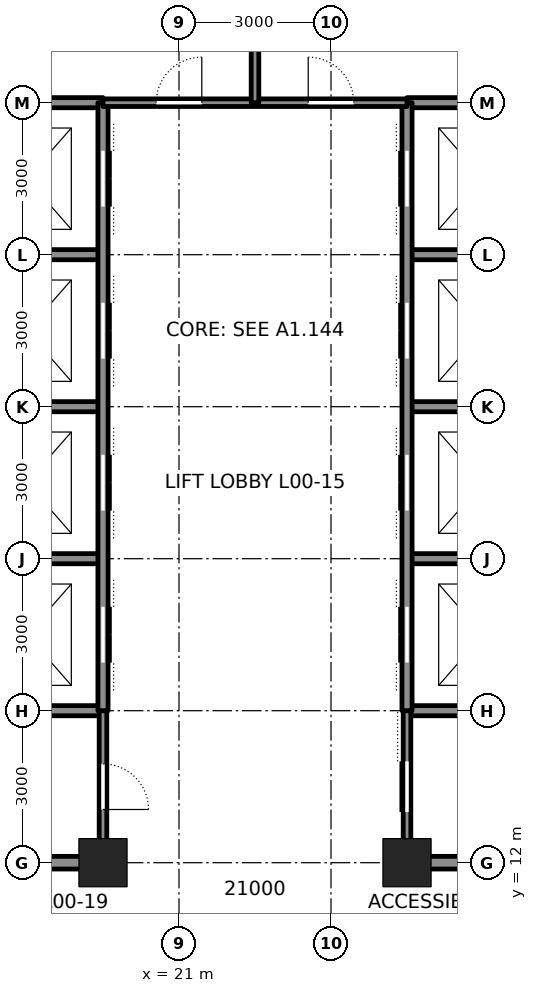
"""IFC4 building model, lengths in metres.
Left out: names, types, materials, properties, quantities, classifications, styles, units other than length and angle.
Written with IfcOpenShell. Run it as: python <this file> out.ifc"""

import sys

from ifc_helpers import new_model, si_unit, direction, frame, frame_2d, origin, origin_2d, place, context, subcontext, project, spatial, rectangle, hollow_rectangle, extrude, element, fill, save


model = new_model("IFC4")
c1 = context("Model", 3, precision=1e-05, world=origin(), true_north=direction((0.0, 1.0)))
c2 = subcontext(c1, "Body", "Model", "MODEL_VIEW")
j1 = project(units=[si_unit("LENGTHUNIT", "METRE"), si_unit("PLANEANGLEUNIT", "RADIAN")], contexts=[c1])
p1 = place(None, origin())
s1 = spatial("IfcSite", under=j1, at=p1, CompositionType="ELEMENT")
p2 = place(p1, origin())
s2 = spatial("IfcBuilding", under=s1, at=p2, CompositionType="ELEMENT")
p3 = place(p2, origin())
s3 = spatial("IfcBuildingStorey", under=s2, at=p3, CompositionType="ELEMENT", Elevation=0.0)
for number, where, z_axis, x_axis in (
    (1, (19.5, 12.0, 0.0), (0.0, 0.0, 1.0), (1.0, 0.0, 0.0)),
    (2, (25.5, 12.0, 0.0), (0.0, 0.0, 1.0), (1.0, 0.0, 0.0)),
):
    element("IfcColumn", number, at=place(p3, frame(where, z_axis=z_axis, x_axis=x_axis)), inside=s3, PredefinedType="COLUMN", context=c2, shape_type="SweptSolid", body=[
        extrude(hollow_rectangle(XDim=0.95, YDim=0.95, WallThickness=0.095, at=origin_2d()), origin(), (0.0, 0.0, 1.0), 6.0),
    ])
for number, where, z_axis, x_axis in (
    (3, (16.75, 12.0, 0.0), (0.0, 0.0, 1.0), (1.0, 0.0, 0.0)),
    (4, (25.75, 12.0, 0.0), (0.0, 0.0, 1.0), (1.0, 0.0, 0.0)),
):
    element("IfcWall", number, at=place(p3, frame(where, z_axis=z_axis, x_axis=x_axis)), inside=s3, PredefinedType="SOLIDWALL", context=c2, shape_type="SweptSolid", body=[
        extrude(rectangle(XDim=2.5, YDim=0.25, at=frame_2d((1.25, 0.0))), origin(), (0.0, 0.0, 1.0), 4.941),
    ])
for number, where, z_axis, x_axis in (
    (5, (12.0, 15.0, 0.0), (0.0, 0.0, 1.0), (1.0, 0.0, 0.0)),
    (6, (25.5, 15.0, 0.0), (0.0, 0.0, 1.0), (1.0, 0.0, 0.0)),
):
    element("IfcWall", number, at=place(p3, frame(where, z_axis=z_axis, x_axis=x_axis)), inside=s3, PredefinedType="SOLIDWALL", context=c2, shape_type="SweptSolid", body=[
        extrude(rectangle(XDim=7.5, YDim=0.2, at=frame_2d((3.75, 0.0))), origin(), (0.0, 0.0, 1.0), 5.8),
    ])
for number, where, z_axis, x_axis in (
    (7, (16.75, 24.0, 0.0), (0.0, 0.0, 1.0), (1.0, 0.0, 0.0)),
    (8, (25.5, 24.0, 0.0), (0.0, 0.0, 1.0), (1.0, 0.0, 0.0)),
):
    element("IfcWall", number, at=place(p3, frame(where, z_axis=z_axis, x_axis=x_axis)), inside=s3, PredefinedType="SOLIDWALL", context=c2, shape_type="SweptSolid", body=[
        extrude(rectangle(XDim=2.75, YDim=0.2, at=frame_2d((1.375, 0.0))), origin(), (0.0, 0.0, 1.0), 4.85),
    ])
p4 = place(p3, frame((12.0, 27.0, 0.0), z_axis=(0.0, 0.0, 1.0), x_axis=(1.0, 0.0, 0.0)))
e9 = element("IfcWall", 9, at=p4, inside=s3, PredefinedType="SOLIDWALL", context=c2, shape_type="SweptSolid", body=[
    extrude(rectangle(XDim=7.5, YDim=0.2, at=frame_2d((3.75, 0.0))), origin(), (0.0, 0.0, 1.0), 5.8),
])
p5 = place(p4, frame((1.65, 0.0, 0.0)))
e10 = element("IfcOpeningElement", 10, at=p5, cuts=e9, PredefinedType="OPENING", context=c2, shape_type="SweptSolid", body=[
    extrude(rectangle(XDim=1.2, YDim=2.1, at=frame_2d((0.6, 1.05))), frame((0.0, 0.11, 0.0), z_axis=(0.0, -1.0, 0.0), x_axis=(1.0, 0.0, 0.0)), (0.0, 0.0, 1.0), 0.22),
])
for number, where, z_axis, x_axis in (
    (11, (25.5, 27.0, 0.0), (0.0, 0.0, 1.0), (1.0, 0.0, 0.0)),
    (12, (16.5, 18.0, 0.0), (0.0, 0.0, 1.0), (1.0, 0.0, 0.0)),
):
    element("IfcWall", number, at=place(p3, frame(where, z_axis=z_axis, x_axis=x_axis)), inside=s3, PredefinedType="SOLIDWALL", context=c2, shape_type="SweptSolid", body=[
        extrude(rectangle(XDim=3.0, YDim=0.2, at=frame_2d((1.5, 0.0))), origin(), (0.0, 0.0, 1.0), 5.8),
    ])
p6 = place(p3, frame((25.5, 18.0, 0.0), z_axis=(0.0, 0.0, 1.0), x_axis=(1.0, 0.0, 0.0)))
e13 = element("IfcWall", 13, at=p6, inside=s3, PredefinedType="SOLIDWALL", context=c2, shape_type="SweptSolid", body=[
    extrude(rectangle(XDim=7.5, YDim=0.2, at=frame_2d((3.75, 0.0))), origin(), (0.0, 0.0, 1.0), 5.8),
])
p7 = place(p6, frame((4.65, 0.0, 0.0)))
e14 = element("IfcOpeningElement", 14, at=p7, cuts=e13, PredefinedType="OPENING", context=c2, shape_type="SweptSolid", body=[
    extrude(rectangle(XDim=1.2, YDim=2.1, at=frame_2d((0.6, 1.05))), frame((0.0, 0.11, 0.0), z_axis=(0.0, -1.0, 0.0), x_axis=(1.0, 0.0, 0.0)), (0.0, 0.0, 1.0), 0.22),
])
for number, where, z_axis, x_axis in (
    (15, (16.75, 21.0, 0.0), (0.0, 0.0, 1.0), (1.0, 0.0, 0.0)),
    (16, (25.5, 21.0, 0.0), (0.0, 0.0, 1.0), (1.0, 0.0, 0.0)),
):
    element("IfcWall", number, at=place(p3, frame(where, z_axis=z_axis, x_axis=x_axis)), inside=s3, PredefinedType="SOLIDWALL", context=c2, shape_type="SweptSolid", body=[
        extrude(rectangle(XDim=2.75, YDim=0.2, at=frame_2d((1.375, 0.0))), origin(), (0.0, 0.0, 1.0), 4.85),
    ])
p8 = place(p3, frame((19.5, 12.25, 0.0), z_axis=(0.0, 0.0, 1.0), x_axis=(0.0, 1.0, 0.0)))
e17 = element("IfcWall", 17, at=p8, inside=s3, PredefinedType="PARTITIONING", context=c2, shape_type="SweptSolid", body=[
    extrude(rectangle(XDim=2.75, YDim=0.15, at=frame_2d((1.375, 0.0))), origin(), (0.0, 0.0, 1.0), 4.825),
])
p9 = place(p8, frame((0.8, 0.0, 0.0)))
e18 = element("IfcOpeningElement", 18, at=p9, cuts=e17, PredefinedType="OPENING", context=c2, shape_type="SweptSolid", body=[
    extrude(rectangle(XDim=0.9, YDim=2.1, at=frame_2d((0.45, 1.05))), frame((0.0, 0.085, 0.0), z_axis=(0.0, -1.0, 0.0), x_axis=(1.0, 0.0, 0.0)), (0.0, 0.0, 1.0), 0.17),
])
p10 = place(p3, frame((19.5, 15.0, 0.0), z_axis=(0.0, 0.0, 1.0), x_axis=(0.0, 1.0, 0.0)))
e19 = element("IfcWall", 19, at=p10, inside=s3, PredefinedType="SOLIDWALL", context=c2, shape_type="SweptSolid", body=[
    extrude(rectangle(XDim=12.0, YDim=0.2, at=frame_2d((6.0, 0.0))), origin(), (0.0, 0.0, 1.0), 4.825),
])
p11 = place(p10, frame((0.95, 0.0, 0.0)))
e20 = element("IfcOpeningElement", 20, at=p11, cuts=e19, PredefinedType="OPENING", context=c2, shape_type="SweptSolid", body=[
    extrude(rectangle(XDim=1.1, YDim=2.1, at=frame_2d((0.55, 1.05))), frame((0.0, 0.11, 0.0), z_axis=(0.0, -1.0, 0.0), x_axis=(1.0, 0.0, 0.0)), (0.0, 0.0, 1.0), 0.22),
])
p12 = place(p10, frame((3.95, 0.0, 0.0)))
e21 = element("IfcOpeningElement", 21, at=p12, cuts=e19, PredefinedType="OPENING", context=c2, shape_type="SweptSolid", body=[
    extrude(rectangle(XDim=1.1, YDim=2.1, at=frame_2d((0.55, 1.05))), frame((0.0, 0.11, 0.0), z_axis=(0.0, -1.0, 0.0), x_axis=(1.0, 0.0, 0.0)), (0.0, 0.0, 1.0), 0.22),
])
p13 = place(p10, frame((6.95, 0.0, 0.0)))
e22 = element("IfcOpeningElement", 22, at=p13, cuts=e19, PredefinedType="OPENING", context=c2, shape_type="SweptSolid", body=[
    extrude(rectangle(XDim=1.1, YDim=2.1, at=frame_2d((0.55, 1.05))), frame((0.0, 0.11, 0.0), z_axis=(0.0, -1.0, 0.0), x_axis=(1.0, 0.0, 0.0)), (0.0, 0.0, 1.0), 0.22),
])
p14 = place(p10, frame((9.95, 0.0, 0.0)))
e23 = element("IfcOpeningElement", 23, at=p14, cuts=e19, PredefinedType="OPENING", context=c2, shape_type="SweptSolid", body=[
    extrude(rectangle(XDim=1.1, YDim=2.1, at=frame_2d((0.55, 1.05))), frame((0.0, 0.11, 0.0), z_axis=(0.0, -1.0, 0.0), x_axis=(1.0, 0.0, 0.0)), (0.0, 0.0, 1.0), 0.22),
])
p15 = place(p3, frame((25.5, 12.25, 0.0), z_axis=(0.0, 0.0, 1.0), x_axis=(0.0, 1.0, 0.0)))
e24 = element("IfcWall", 24, at=p15, inside=s3, PredefinedType="PARTITIONING", context=c2, shape_type="SweptSolid", body=[
    extrude(rectangle(XDim=2.75, YDim=0.15, at=frame_2d((1.375, 0.0))), origin(), (0.0, 0.0, 1.0), 4.825),
])
p16 = place(p15, frame((0.75, 0.0, 0.0)))
e25 = element("IfcOpeningElement", 25, at=p16, cuts=e24, PredefinedType="OPENING", context=c2, shape_type="SweptSolid", body=[
    extrude(rectangle(XDim=1.0, YDim=2.1, at=frame_2d((0.5, 1.05))), frame((0.0, 0.085, 0.0), z_axis=(0.0, -1.0, 0.0), x_axis=(1.0, 0.0, 0.0)), (0.0, 0.0, 1.0), 0.17),
])
p17 = place(p3, frame((25.5, 15.0, 0.0), z_axis=(0.0, 0.0, 1.0), x_axis=(0.0, 1.0, 0.0)))
e26 = element("IfcWall", 26, at=p17, inside=s3, PredefinedType="SOLIDWALL", context=c2, shape_type="SweptSolid", body=[
    extrude(rectangle(XDim=12.0, YDim=0.2, at=frame_2d((6.0, 0.0))), origin(), (0.0, 0.0, 1.0), 4.825),
])
p18 = place(p17, frame((0.95, 0.0, 0.0)))
e27 = element("IfcOpeningElement", 27, at=p18, cuts=e26, PredefinedType="OPENING", context=c2, shape_type="SweptSolid", body=[
    extrude(rectangle(XDim=1.1, YDim=2.1, at=frame_2d((0.55, 1.05))), frame((0.0, 0.11, 0.0), z_axis=(0.0, -1.0, 0.0), x_axis=(1.0, 0.0, 0.0)), (0.0, 0.0, 1.0), 0.22),
])
p19 = place(p17, frame((3.95, 0.0, 0.0)))
e28 = element("IfcOpeningElement", 28, at=p19, cuts=e26, PredefinedType="OPENING", context=c2, shape_type="SweptSolid", body=[
    extrude(rectangle(XDim=1.1, YDim=2.1, at=frame_2d((0.55, 1.05))), frame((0.0, 0.11, 0.0), z_axis=(0.0, -1.0, 0.0), x_axis=(1.0, 0.0, 0.0)), (0.0, 0.0, 1.0), 0.22),
])
p20 = place(p17, frame((6.95, 0.0, 0.0)))
e29 = element("IfcOpeningElement", 29, at=p20, cuts=e26, PredefinedType="OPENING", context=c2, shape_type="SweptSolid", body=[
    extrude(rectangle(XDim=1.1, YDim=2.1, at=frame_2d((0.55, 1.05))), frame((0.0, 0.11, 0.0), z_axis=(0.0, -1.0, 0.0), x_axis=(1.0, 0.0, 0.0)), (0.0, 0.0, 1.0), 0.22),
])
p21 = place(p17, frame((9.95, 0.0, 0.0)))
e30 = element("IfcOpeningElement", 30, at=p21, cuts=e26, PredefinedType="OPENING", context=c2, shape_type="SweptSolid", body=[
    extrude(rectangle(XDim=1.1, YDim=2.1, at=frame_2d((0.55, 1.05))), frame((0.0, 0.11, 0.0), z_axis=(0.0, -1.0, 0.0), x_axis=(1.0, 0.0, 0.0)), (0.0, 0.0, 1.0), 0.22),
])
p22 = place(p3, frame((19.5, 27.0, 0.0), z_axis=(0.0, 0.0, 1.0), x_axis=(1.0, 0.0, 0.0)))
e31 = element("IfcWall", 31, at=p22, inside=s3, PredefinedType="PARTITIONING", context=c2, shape_type="SweptSolid", body=[
    extrude(rectangle(XDim=6.0, YDim=0.15, at=frame_2d((3.0, 0.0))), origin(), (0.0, 0.0, 1.0), 5.8),
])
p23 = place(p22, frame((1.05, 0.0, 0.0)))
e32 = element("IfcOpeningElement", 32, at=p23, cuts=e31, PredefinedType="OPENING", context=c2, shape_type="SweptSolid", body=[
    extrude(rectangle(XDim=0.9, YDim=2.1, at=frame_2d((0.45, 1.05))), frame((0.0, 0.085, 0.0), z_axis=(0.0, -1.0, 0.0), x_axis=(1.0, 0.0, 0.0)), (0.0, 0.0, 1.0), 0.17),
])
p24 = place(p22, frame((4.05, 0.0, 0.0)))
e33 = element("IfcOpeningElement", 33, at=p24, cuts=e31, PredefinedType="OPENING", context=c2, shape_type="SweptSolid", body=[
    extrude(rectangle(XDim=0.9, YDim=2.1, at=frame_2d((0.45, 1.05))), frame((0.0, 0.085, 0.0), z_axis=(0.0, -1.0, 0.0), x_axis=(1.0, 0.0, 0.0)), (0.0, 0.0, 1.0), 0.17),
])
p25 = place(p3, frame((22.5, 27.0, 0.0), z_axis=(0.0, 0.0, 1.0), x_axis=(0.0, 1.0, 0.0)))
e34 = element("IfcWall", 34, at=p25, inside=s3, PredefinedType="PARTITIONING", context=c2, shape_type="SweptSolid", body=[
    extrude(rectangle(XDim=6.0, YDim=0.15, at=frame_2d((3.0, 0.0))), origin(), (0.0, 0.0, 1.0), 5.8),
])
p26 = place(p23, origin())
e35 = element("IfcDoor", 35, at=p26, inside=s3, OperationType="SINGLE_SWING_RIGHT", PredefinedType="DOOR", context=c2, shape_type="SweptSolid", body=[
    extrude(rectangle(XDim=0.9, YDim=2.1, at=frame_2d((0.45, 1.05))), frame((0.0, 0.025, 0.0), z_axis=(0.0, -1.0, 0.0), x_axis=(1.0, 0.0, 0.0)), (0.0, 0.0, 1.0), 0.05),
])
fill(e32, e35)
p27 = place(p24, origin())
e36 = element("IfcDoor", 36, at=p27, inside=s3, OperationType="SINGLE_SWING_LEFT", PredefinedType="DOOR", context=c2, shape_type="SweptSolid", body=[
    extrude(rectangle(XDim=0.9, YDim=2.1, at=frame_2d((0.45, 1.05))), frame((0.0, 0.025, 0.0), z_axis=(0.0, -1.0, 0.0), x_axis=(1.0, 0.0, 0.0)), (0.0, 0.0, 1.0), 0.05),
])
fill(e33, e36)
p28 = place(p16, origin())
e37 = element("IfcDoor", 37, at=p28, inside=s3, OperationType="SLIDING_TO_LEFT", PredefinedType="DOOR", context=c2, shape_type="SweptSolid", body=[
    extrude(rectangle(XDim=1.0, YDim=2.1, at=frame_2d((0.5, 1.05))), frame((0.0, 0.025, 0.0), z_axis=(0.0, -1.0, 0.0), x_axis=(1.0, 0.0, 0.0)), (0.0, 0.0, 1.0), 0.05),
])
fill(e25, e37)
p29 = place(p9, frame((0.9, 0.0, 0.0), z_axis=(0.0, 0.0, 1.0), x_axis=(-1.0, 0.0, 0.0)))
e38 = element("IfcDoor", 38, at=p29, inside=s3, OperationType="SINGLE_SWING_RIGHT", PredefinedType="DOOR", context=c2, shape_type="SweptSolid", body=[
    extrude(rectangle(XDim=0.9, YDim=2.1, at=frame_2d((0.45, 1.05))), frame((0.0, 0.025, 0.0), z_axis=(0.0, -1.0, 0.0), x_axis=(1.0, 0.0, 0.0)), (0.0, 0.0, 1.0), 0.05),
])
fill(e18, e38)
p30 = place(p11, origin())
e39 = element("IfcDoor", 39, at=p30, inside=s3, OperationType="DOUBLE_DOOR_SLIDING", PredefinedType="DOOR", context=c2, shape_type="SweptSolid", body=[
    extrude(rectangle(XDim=1.1, YDim=2.1, at=frame_2d((0.55, 1.05))), frame((0.0, 0.025, 0.0), z_axis=(0.0, -1.0, 0.0), x_axis=(1.0, 0.0, 0.0)), (0.0, 0.0, 1.0), 0.05),
])
fill(e20, e39)
p31 = place(p18, origin())
e40 = element("IfcDoor", 40, at=p31, inside=s3, OperationType="DOUBLE_DOOR_SLIDING", PredefinedType="DOOR", context=c2, shape_type="SweptSolid", body=[
    extrude(rectangle(XDim=1.1, YDim=2.1, at=frame_2d((0.55, 1.05))), frame((0.0, 0.025, 0.0), z_axis=(0.0, -1.0, 0.0), x_axis=(1.0, 0.0, 0.0)), (0.0, 0.0, 1.0), 0.05),
])
fill(e27, e40)
p32 = place(p12, origin())
e41 = element("IfcDoor", 41, at=p32, inside=s3, OperationType="DOUBLE_DOOR_SLIDING", PredefinedType="DOOR", context=c2, shape_type="SweptSolid", body=[
    extrude(rectangle(XDim=1.1, YDim=2.1, at=frame_2d((0.55, 1.05))), frame((0.0, 0.025, 0.0), z_axis=(0.0, -1.0, 0.0), x_axis=(1.0, 0.0, 0.0)), (0.0, 0.0, 1.0), 0.05),
])
fill(e21, e41)
p33 = place(p19, origin())
e42 = element("IfcDoor", 42, at=p33, inside=s3, OperationType="DOUBLE_DOOR_SLIDING", PredefinedType="DOOR", context=c2, shape_type="SweptSolid", body=[
    extrude(rectangle(XDim=1.1, YDim=2.1, at=frame_2d((0.55, 1.05))), frame((0.0, 0.025, 0.0), z_axis=(0.0, -1.0, 0.0), x_axis=(1.0, 0.0, 0.0)), (0.0, 0.0, 1.0), 0.05),
])
fill(e28, e42)
p34 = place(p13, origin())
e43 = element("IfcDoor", 43, at=p34, inside=s3, OperationType="DOUBLE_DOOR_SLIDING", PredefinedType="DOOR", context=c2, shape_type="SweptSolid", body=[
    extrude(rectangle(XDim=1.1, YDim=2.1, at=frame_2d((0.55, 1.05))), frame((0.0, 0.025, 0.0), z_axis=(0.0, -1.0, 0.0), x_axis=(1.0, 0.0, 0.0)), (0.0, 0.0, 1.0), 0.05),
])
fill(e22, e43)
p35 = place(p20, origin())
e44 = element("IfcDoor", 44, at=p35, inside=s3, OperationType="DOUBLE_DOOR_SLIDING", PredefinedType="DOOR", context=c2, shape_type="SweptSolid", body=[
    extrude(rectangle(XDim=1.1, YDim=2.1, at=frame_2d((0.55, 1.05))), frame((0.0, 0.025, 0.0), z_axis=(0.0, -1.0, 0.0), x_axis=(1.0, 0.0, 0.0)), (0.0, 0.0, 1.0), 0.05),
])
fill(e29, e44)
p36 = place(p14, origin())
e45 = element("IfcDoor", 45, at=p36, inside=s3, OperationType="DOUBLE_DOOR_SLIDING", PredefinedType="DOOR", context=c2, shape_type="SweptSolid", body=[
    extrude(rectangle(XDim=1.1, YDim=2.1, at=frame_2d((0.55, 1.05))), frame((0.0, 0.025, 0.0), z_axis=(0.0, -1.0, 0.0), x_axis=(1.0, 0.0, 0.0)), (0.0, 0.0, 1.0), 0.05),
])
fill(e23, e45)
p37 = place(p21, origin())
e46 = element("IfcDoor", 46, at=p37, inside=s3, OperationType="DOUBLE_DOOR_SLIDING", PredefinedType="DOOR", context=c2, shape_type="SweptSolid", body=[
    extrude(rectangle(XDim=1.1, YDim=2.1, at=frame_2d((0.55, 1.05))), frame((0.0, 0.025, 0.0), z_axis=(0.0, -1.0, 0.0), x_axis=(1.0, 0.0, 0.0)), (0.0, 0.0, 1.0), 0.05),
])
fill(e30, e46)
save(model, sys.argv[1])
